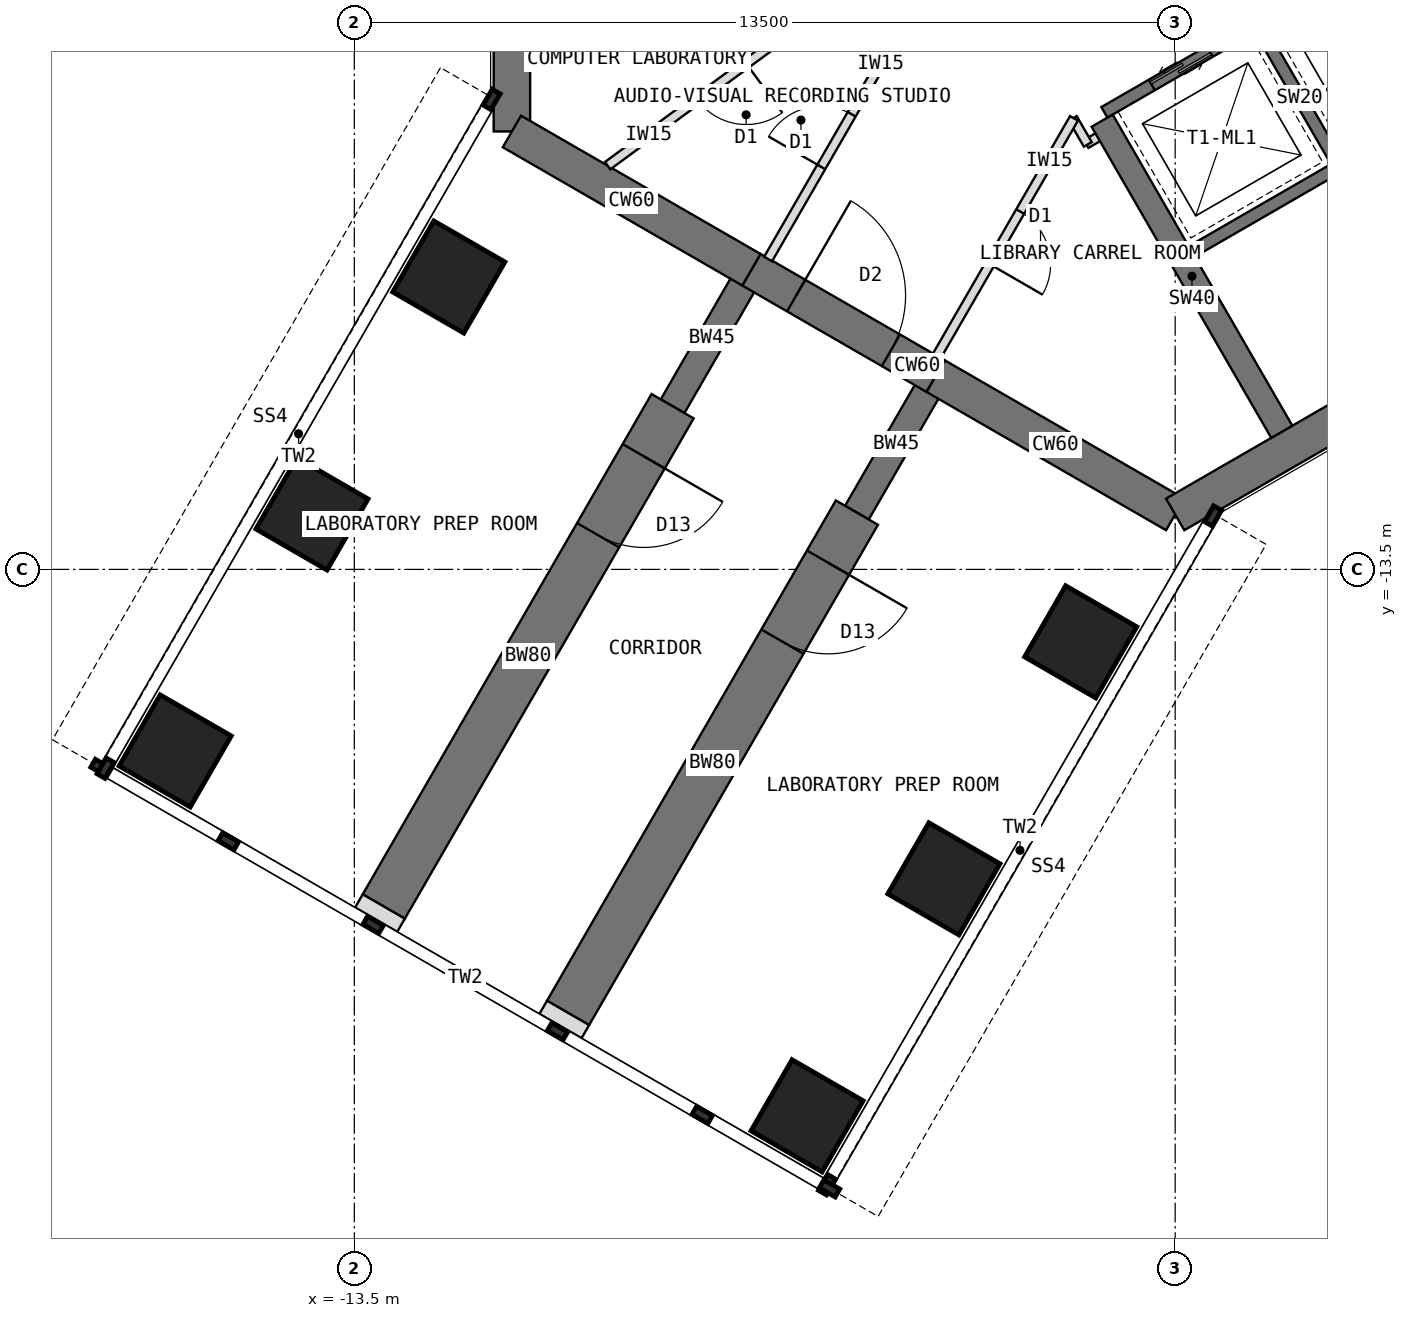
"""IFC4 building model, lengths in metres.
Left out: names, types, materials, properties, quantities, classifications, styles, units other than length and angle.
Written with IfcOpenShell. Run it as: python <this file> out.ifc"""

import sys

from ifc_helpers import new_model, si_unit, direction, frame, frame_2d, origin, origin_2d, place, context, subcontext, project, spatial, rectangle, extrude, element, fill, save


model = new_model("IFC4")
c1 = context("Model", 3, precision=1e-05, world=origin(), true_north=direction((0.0, 1.0)))
c2 = subcontext(c1, "Body", "Model", "MODEL_VIEW")
j1 = project(units=[si_unit("LENGTHUNIT", "METRE"), si_unit("PLANEANGLEUNIT", "RADIAN")], contexts=[c1])
p1 = place(None, origin())
s1 = spatial("IfcSite", under=j1, at=p1, CompositionType="ELEMENT")
p2 = place(p1, origin())
s2 = spatial("IfcBuilding", under=s1, at=p2, CompositionType="ELEMENT")
p3 = place(p2, frame((0.0, 0.0, 101.5)))
s3 = spatial("IfcBuildingStorey", under=s2, at=p3, CompositionType="ELEMENT", Elevation=101.5)
p4 = place(p3, frame((-10.908, 6.298, 0.0), z_axis=(0.0, 0.0, 1.0), x_axis=(0.0, -1.0, 0.0)))
e1 = element("IfcWall", 1, at=p4, inside=s3, PredefinedType="SHEAR", context=c2, shape_type="SweptSolid", body=[
    extrude(rectangle(XDim=12.596, YDim=0.6, at=frame_2d((6.298, 0.0))), origin(), (0.0, 0.0, 1.0), 4.0),
])
p5 = place(p3, frame((-10.908, -6.298, 0.0), z_axis=(0.0, 0.0, 1.0), x_axis=(0.866034513004, -0.499984222037, 0.0)))
e2 = element("IfcWall", 2, at=p5, inside=s3, PredefinedType="SHEAR", context=c2, shape_type="SweptSolid", body=[
    extrude(rectangle(XDim=4.548, YDim=0.6, at=frame_2d((2.274, 0.0))), origin(), (0.0, 0.0, 1.0), 4.0),
])
p6 = place(p3, frame((-6.97, -8.572, 0.0), z_axis=(0.0, 0.0, 1.0), x_axis=(0.866019471182, -0.500010275428, 0.0)))
e3 = element("IfcWall", 3, at=p6, inside=s3, PredefinedType="SHEAR", context=c2, shape_type="SweptSolid", body=[
    extrude(rectangle(XDim=3.5, YDim=0.6, at=frame_2d((1.75, 0.0))), origin(), (0.0, 0.0, 1.0), 4.0),
])
p7 = place(p6, frame((0.85, 0.0, 0.0)))
e4 = element("IfcOpeningElement", 4, at=p7, cuts=e3, PredefinedType="OPENING", context=c2, shape_type="SweptSolid", body=[
    extrude(rectangle(XDim=1.8, YDim=2.1, at=frame_2d((0.9, 1.05))), frame((0.0, 0.31, 0.0), z_axis=(0.0, -1.0, 0.0), x_axis=(1.0, 0.0, 0.0)), (0.0, 0.0, 1.0), 0.62),
])
p8 = place(p3, frame((-3.939, -10.322, 0.0), z_axis=(0.0, 0.0, 1.0), x_axis=(0.866011268655, -0.500024481964, 0.0)))
e5 = element("IfcWall", 5, at=p8, inside=s3, PredefinedType="SHEAR", context=c2, shape_type="SweptSolid", body=[
    extrude(rectangle(XDim=4.548, YDim=0.6, at=frame_2d((2.274, 0.0))), origin(), (0.0, 0.0, 1.0), 4.0),
])
p9 = place(p3, frame((0.0, -12.596, 0.0), z_axis=(0.0, 0.0, 1.0), x_axis=(0.866021940709, 0.500005998175, 0.0)))
e6 = element("IfcWall", 6, at=p9, inside=s3, PredefinedType="SHEAR", context=c2, shape_type="SweptSolid", body=[
    extrude(rectangle(XDim=12.596, YDim=0.6, at=frame_2d((6.298, 0.0))), origin(), (0.0, 0.0, 1.0), 4.0),
])
p10 = place(p3, frame((-3.939, -10.322, 0.0), z_axis=(0.0, 0.0, 1.0), x_axis=(-0.499918158782, -0.866072649678, 0.0)))
e7 = element("IfcWall", 7, at=p10, inside=s3, PredefinedType="SHEAR", context=c2, shape_type="SweptSolid", body=[
    extrude(rectangle(XDim=2.592, YDim=0.45, at=frame_2d((1.296, 0.0))), origin(), (0.0, 0.0, 1.0), 4.0),
])
p11 = place(p3, frame((-5.234, -12.566, 0.0), z_axis=(0.0, 0.0, 1.0), x_axis=(-0.499997557548, -0.86602681393, 0.0)))
e8 = element("IfcWall", 8, at=p11, inside=s3, PredefinedType="SHEAR", context=c2, shape_type="SweptSolid", body=[
    extrude(rectangle(XDim=9.5, YDim=0.8, at=frame_2d((4.75, 0.0))), origin(), (0.0, 0.0, 1.0), 4.0),
])
p12 = place(p11, frame((0.95, 0.0, 0.0)))
e9 = element("IfcOpeningElement", 9, at=p12, cuts=e8, PredefinedType="OPENING", context=c2, shape_type="SweptSolid", body=[
    extrude(rectangle(XDim=1.5, YDim=2.1, at=frame_2d((0.75, 1.05))), frame((0.0, 0.41, 0.0), z_axis=(0.0, -1.0, 0.0), x_axis=(1.0, 0.0, 0.0)), (0.0, 0.0, 1.0), 0.82),
])
p13 = place(p3, frame((-6.97, -8.572, 0.0), z_axis=(0.0, 0.0, 1.0), x_axis=(-0.499988811324, -0.866031863473, 0.0)))
e10 = element("IfcWall", 10, at=p13, inside=s3, PredefinedType="SHEAR", context=c2, shape_type="SweptSolid", body=[
    extrude(rectangle(XDim=2.592, YDim=0.45, at=frame_2d((1.296, 0.0))), origin(), (0.0, 0.0, 1.0), 4.0),
])
p14 = place(p3, frame((-8.266, -10.816, 0.0), z_axis=(0.0, 0.0, 1.0), x_axis=(-0.499997557548, -0.86602681393, 0.0)))
e11 = element("IfcWall", 11, at=p14, inside=s3, PredefinedType="SHEAR", context=c2, shape_type="SweptSolid", body=[
    extrude(rectangle(XDim=9.5, YDim=0.8, at=frame_2d((4.75, 0.0))), origin(), (0.0, 0.0, 1.0), 4.0),
])
p15 = place(p14, frame((0.95, 0.0, 0.0)))
e12 = element("IfcOpeningElement", 12, at=p15, cuts=e11, PredefinedType="OPENING", context=c2, shape_type="SweptSolid", body=[
    extrude(rectangle(XDim=1.5, YDim=2.1, at=frame_2d((0.75, 1.05))), frame((0.0, 0.41, 0.0), z_axis=(0.0, -1.0, 0.0), x_axis=(1.0, 0.0, 0.0)), (0.0, 0.0, 1.0), 0.82),
])
for number, where, z_axis, x_axis in (
    (13, (-1.554, -14.691, 0.0), (0.0, 0.0, 1.0), (0.5, 0.866, 0.0)),
    (14, (-11.946, -8.691, 0.0), (0.0, 0.0, 1.0), (0.5, 0.866, 0.0)),
    (15, (-3.804, -18.588, 0.0), (0.0, 0.0, 1.0), (0.5, 0.866, 0.0)),
    (16, (-14.196, -12.588, 0.0), (0.0, 0.0, 1.0), (0.5, 0.866, 0.0)),
    (17, (-6.054, -22.486, 0.0), (0.0, 0.0, 1.0), (0.5, 0.866, 0.0)),
    (18, (-16.446, -16.486, 0.0), (0.0, 0.0, 1.0), (0.5, 0.866, 0.0)),
):
    element("IfcColumn", number, at=place(p3, frame(where, z_axis=z_axis, x_axis=x_axis)), inside=s3, PredefinedType="COLUMN", context=c2, shape_type="SweptSolid", body=[
        extrude(rectangle(XDim=1.35, YDim=1.35, at=origin_2d()), origin(), (0.0, 0.0, 1.0), 4.0),
    ])
for number, where, z_axis, x_axis in (
    (19, (-9.984, -20.794, 0.0), (0.0, 0.0, 1.0), (-0.5, -0.866, 0.0)),
    (20, (-13.016, -19.044, 0.0), (0.0, 0.0, 1.0), (-0.5, -0.866, 0.0)),
):
    element("IfcWall", number, at=place(p3, frame(where, z_axis=z_axis, x_axis=x_axis)), inside=s3, PredefinedType="PARTITIONING", context=c2, shape_type="SweptSolid", body=[
        extrude(rectangle(XDim=0.25, YDim=0.8, at=frame_2d((0.125, 0.0))), origin(), (0.0, 0.0, 1.0), 3.8),
    ])
p16 = place(p3, frame((-1.164, -5.984, 0.0), z_axis=(0.0, 0.0, 1.0), x_axis=(0.866026010844, 0.49999894854, 0.0)))
e21 = element("IfcWall", 21, at=p16, inside=s3, PredefinedType="SHEAR", context=c2, shape_type="SweptSolid", body=[
    extrude(rectangle(XDim=8.0, YDim=0.2, at=frame_2d((4.0, 0.0))), origin(), (0.0, 0.0, 1.0), 4.0),
])
p17 = place(p16, frame((6.3, 0.0, 0.0)))
e22 = element("IfcOpeningElement", 22, at=p17, cuts=e21, PredefinedType="OPENING", context=c2, shape_type="SweptSolid", body=[
    extrude(rectangle(XDim=1.2, YDim=2.1, at=frame_2d((0.6, 1.05))), frame((0.0, 0.11, 0.0), z_axis=(0.0, -1.0, 0.0), x_axis=(1.0, 0.0, 0.0)), (0.0, 0.0, 1.0), 0.22),
])
p18 = place(p16, frame((0.9, 0.0, 0.0)))
e23 = element("IfcOpeningElement", 23, at=p18, cuts=e21, PredefinedType="OPENING", context=c2, shape_type="SweptSolid", body=[
    extrude(rectangle(XDim=1.1, YDim=2.2, at=frame_2d((0.55, 1.1))), frame((0.0, 0.11, 0.0), z_axis=(0.0, -1.0, 0.0), x_axis=(1.0, 0.0, 0.0)), (0.0, 0.0, 1.0), 0.22),
])
p19 = place(p16, frame((3.8, 0.0, 0.0)))
e24 = element("IfcOpeningElement", 24, at=p19, cuts=e21, PredefinedType="OPENING", context=c2, shape_type="SweptSolid", body=[
    extrude(rectangle(XDim=1.1, YDim=2.2, at=frame_2d((0.55, 1.1))), frame((0.0, 0.11, 0.0), z_axis=(0.0, -1.0, 0.0), x_axis=(1.0, 0.0, 0.0)), (0.0, 0.0, 1.0), 0.22),
])
p20 = place(p3, frame((1.397, -4.62, 0.0), z_axis=(0.0, 0.0, 1.0), x_axis=(0.499936506574, -0.866062058628, 0.0)))
e25 = element("IfcWall", 25, at=p20, inside=s3, PredefinedType="SHEAR", context=c2, shape_type="SweptSolid", body=[
    extrude(rectangle(XDim=2.6, YDim=0.2, at=frame_2d((1.3, 0.0))), origin(), (0.0, 0.0, 1.0), 4.0),
])
p21 = place(p3, frame((0.186, -8.322, 0.0), z_axis=(0.0, 0.0, 1.0), x_axis=(0.866026010844, 0.49999894854, 0.0)))
e26 = element("IfcWall", 26, at=p21, inside=s3, PredefinedType="SHEAR", context=c2, shape_type="SweptSolid", body=[
    extrude(rectangle(XDim=8.0, YDim=0.2, at=frame_2d((4.0, 0.0))), origin(), (0.0, 0.0, 1.0), 4.0),
])
p22 = place(p21, frame((6.7, 0.0, 0.0)))
e27 = element("IfcOpeningElement", 27, at=p22, cuts=e26, PredefinedType="OPENING", context=c2, shape_type="SweptSolid", body=[
    extrude(rectangle(XDim=1.1, YDim=2.1, at=frame_2d((0.55, 1.05))), frame((0.0, 0.11, 0.0), z_axis=(0.0, -1.0, 0.0), x_axis=(1.0, 0.0, 0.0)), (0.0, 0.0, 1.0), 0.22),
])
p23 = place(p3, frame((-1.201, -6.12, 0.0), z_axis=(0.0, 0.0, 1.0), x_axis=(0.49999668571, -0.866027317282, 0.0)))
e28 = element("IfcWall", 28, at=p23, inside=s3, PredefinedType="SHEAR", context=c2, shape_type="SweptSolid", body=[
    extrude(rectangle(XDim=5.908, YDim=0.4, at=frame_2d((2.954, 0.0))), origin(), (0.0, 0.0, 1.0), 4.0),
])
p24 = place(p3, frame((-1.092, -6.289, 0.0), z_axis=(0.0, 0.0, 1.0), x_axis=(-0.866138304741, -0.499804398801, 0.0)))
e29 = element("IfcWall", 29, at=p24, inside=s3, PredefinedType="PARTITIONING", context=c2, shape_type="SweptSolid", body=[
    extrude(rectangle(XDim=0.43, YDim=0.15, at=frame_2d((0.215, 0.0))), origin(), (0.0, 0.0, 1.0), 3.8),
])
p25 = place(p3, frame((-1.437, -6.511, 0.0), z_axis=(0.0, 0.0, 1.0), x_axis=(-0.50033519877, 0.865831790172, 0.0)))
e30 = element("IfcWall", 30, at=p25, inside=s3, PredefinedType="PARTITIONING", context=c2, shape_type="SweptSolid", body=[
    extrude(rectangle(XDim=0.494, YDim=0.15, at=frame_2d((0.247, 0.0))), origin(), (0.0, 0.0, 1.0), 3.8),
])
p26 = place(p3, frame((-1.664, -6.083, 0.0), z_axis=(0.0, 0.0, 1.0), x_axis=(-0.500032713409, -0.866006515865, 0.0)))
e31 = element("IfcWall", 31, at=p26, inside=s3, PredefinedType="PARTITIONING", context=c2, shape_type="SweptSolid", body=[
    extrude(rectangle(XDim=4.518, YDim=0.15, at=frame_2d((2.259, 0.0))), origin(), (0.0, 0.0, 1.0), 3.8),
])
p27 = place(p26, frame((1.769, 0.0, 0.0)))
e32 = element("IfcOpeningElement", 32, at=p27, cuts=e31, PredefinedType="OPENING", context=c2, shape_type="SweptSolid", body=[
    extrude(rectangle(XDim=1.0, YDim=2.1, at=frame_2d((0.5, 1.05))), frame((0.0, 0.085, 0.0), z_axis=(0.0, -1.0, 0.0), x_axis=(1.0, 0.0, 0.0)), (0.0, 0.0, 1.0), 0.17),
])
p28 = place(p3, frame((-6.695, -8.396, 0.0), z_axis=(0.0, 0.0, 1.0), x_axis=(0.500009315796, 0.86602002524, 0.0)))
e33 = element("IfcWall", 33, at=p28, inside=s3, PredefinedType="PARTITIONING", context=c2, shape_type="SweptSolid", body=[
    extrude(rectangle(XDim=4.519, YDim=0.15, at=frame_2d((2.259, 0.0))), origin(), (0.0, 0.0, 1.0), 3.8),
])
p29 = place(p28, frame((1.749, 0.0, 0.0)))
e34 = element("IfcOpeningElement", 34, at=p29, cuts=e33, PredefinedType="OPENING", context=c2, shape_type="SweptSolid", body=[
    extrude(rectangle(XDim=1.0, YDim=2.1, at=frame_2d((0.5, 1.05))), frame((0.0, 0.085, 0.0), z_axis=(0.0, -1.0, 0.0), x_axis=(1.0, 0.0, 0.0)), (0.0, 0.0, 1.0), 0.17),
])
p30 = place(p3, frame((-5.578, -4.1, 0.0), z_axis=(0.0, 0.0, 1.0), x_axis=(-0.805776726519, -0.592219441593, 0.0)))
e35 = element("IfcWall", 35, at=p30, inside=s3, PredefinedType="PARTITIONING", context=c2, shape_type="SweptSolid", body=[
    extrude(rectangle(XDim=4.661, YDim=0.15, at=frame_2d((2.331, 0.0))), origin(), (0.0, 0.0, 1.0), 3.8),
])
p31 = place(p30, frame((1.831, 0.0, 0.0)))
e36 = element("IfcOpeningElement", 36, at=p31, cuts=e35, PredefinedType="OPENING", context=c2, shape_type="SweptSolid", body=[
    extrude(rectangle(XDim=1.0, YDim=2.1, at=frame_2d((0.5, 1.05))), frame((0.0, 0.085, 0.0), z_axis=(0.0, -1.0, 0.0), x_axis=(1.0, 0.0, 0.0)), (0.0, 0.0, 1.0), 0.17),
])
p32 = place(p18, origin())
e37 = element("IfcDoor", 37, at=p32, inside=s3, OperationType="DOUBLE_DOOR_SLIDING", PredefinedType="DOOR", context=c2, shape_type="SweptSolid", body=[
    extrude(rectangle(XDim=1.1, YDim=2.2, at=frame_2d((0.55, 1.1))), frame((0.0, 0.025, 0.0), z_axis=(0.0, -1.0, 0.0), x_axis=(1.0, 0.0, 0.0)), (0.0, 0.0, 1.0), 0.05),
])
fill(e23, e37)
p33 = place(p7, origin())
e38 = element("IfcDoor", 38, at=p33, inside=s3, OperationType="DOUBLE_DOOR_DOUBLE_SWING", PredefinedType="DOOR", context=c2, shape_type="SweptSolid", body=[
    extrude(rectangle(XDim=1.72, YDim=2.06, at=frame_2d((0.9, 1.03))), frame((0.0, 0.025, 0.0), z_axis=(0.0, -1.0, 0.0), x_axis=(1.0, 0.0, 0.0)), (0.0, 0.0, 1.0), 0.05),
    extrude(rectangle(XDim=0.04, YDim=2.1, at=frame_2d((0.02, 1.05))), frame((0.0, 0.3, 0.0), z_axis=(0.0, -1.0, 0.0), x_axis=(1.0, 0.0, 0.0)), (0.0, 0.0, 1.0), 0.6),
    extrude(rectangle(XDim=0.04, YDim=2.1, at=frame_2d((1.78, 1.05))), frame((0.0, 0.3, 0.0), z_axis=(0.0, -1.0, 0.0), x_axis=(1.0, 0.0, 0.0)), (0.0, 0.0, 1.0), 0.6),
    extrude(rectangle(XDim=1.72, YDim=0.04, at=frame_2d((0.9, 2.08))), frame((0.0, 0.3, 0.0), z_axis=(0.0, -1.0, 0.0), x_axis=(1.0, 0.0, 0.0)), (0.0, 0.0, 1.0), 0.6),
])
fill(e4, e38)
p34 = place(p31, origin())
e39 = element("IfcDoor", 39, at=p34, inside=s3, OperationType="SINGLE_SWING_LEFT", PredefinedType="DOOR", context=c2, shape_type="SweptSolid", body=[
    extrude(rectangle(XDim=1.0, YDim=2.1, at=frame_2d((0.5, 1.05))), frame((0.0, 0.025, 0.0), z_axis=(0.0, -1.0, 0.0), x_axis=(1.0, 0.0, 0.0)), (0.0, 0.0, 1.0), 0.05),
])
fill(e36, e39)
p35 = place(p29, origin())
e40 = element("IfcDoor", 40, at=p35, inside=s3, OperationType="SINGLE_SWING_LEFT", PredefinedType="DOOR", context=c2, shape_type="SweptSolid", body=[
    extrude(rectangle(XDim=1.0, YDim=2.1, at=frame_2d((0.5, 1.05))), frame((0.0, 0.025, 0.0), z_axis=(0.0, -1.0, 0.0), x_axis=(1.0, 0.0, 0.0)), (0.0, 0.0, 1.0), 0.05),
])
fill(e34, e40)
p36 = place(p27, origin())
e41 = element("IfcDoor", 41, at=p36, inside=s3, OperationType="SINGLE_SWING_RIGHT", PredefinedType="DOOR", context=c2, shape_type="SweptSolid", body=[
    extrude(rectangle(XDim=1.0, YDim=2.1, at=frame_2d((0.5, 1.05))), frame((0.0, 0.025, 0.0), z_axis=(0.0, -1.0, 0.0), x_axis=(1.0, 0.0, 0.0)), (0.0, 0.0, 1.0), 0.05),
])
fill(e32, e41)
p37 = place(p12, origin())
e42 = element("IfcDoor", 42, at=p37, inside=s3, OperationType="DOUBLE_DOOR_SINGLE_SWING", PredefinedType="DOOR", context=c2, shape_type="SweptSolid", body=[
    extrude(rectangle(XDim=1.42, YDim=2.06, at=frame_2d((0.75, 1.03))), frame((0.0, 0.025, 0.0), z_axis=(0.0, -1.0, 0.0), x_axis=(1.0, 0.0, 0.0)), (0.0, 0.0, 1.0), 0.05),
    extrude(rectangle(XDim=0.04, YDim=2.1, at=frame_2d((0.02, 1.05))), frame((0.0, 0.4, 0.0), z_axis=(0.0, -1.0, 0.0), x_axis=(1.0, 0.0, 0.0)), (0.0, 0.0, 1.0), 0.8),
    extrude(rectangle(XDim=0.04, YDim=2.1, at=frame_2d((1.48, 1.05))), frame((0.0, 0.4, 0.0), z_axis=(0.0, -1.0, 0.0), x_axis=(1.0, 0.0, 0.0)), (0.0, 0.0, 1.0), 0.8),
    extrude(rectangle(XDim=1.42, YDim=0.04, at=frame_2d((0.75, 2.08))), frame((0.0, 0.4, 0.0), z_axis=(0.0, -1.0, 0.0), x_axis=(1.0, 0.0, 0.0)), (0.0, 0.0, 1.0), 0.8),
])
fill(e9, e42)
p38 = place(p15, origin())
e43 = element("IfcDoor", 43, at=p38, inside=s3, OperationType="DOUBLE_DOOR_SINGLE_SWING", PredefinedType="DOOR", context=c2, shape_type="SweptSolid", body=[
    extrude(rectangle(XDim=1.42, YDim=2.06, at=frame_2d((0.75, 1.03))), frame((0.0, 0.025, 0.0), z_axis=(0.0, -1.0, 0.0), x_axis=(1.0, 0.0, 0.0)), (0.0, 0.0, 1.0), 0.05),
    extrude(rectangle(XDim=0.04, YDim=2.1, at=frame_2d((0.02, 1.05))), frame((0.0, 0.4, 0.0), z_axis=(0.0, -1.0, 0.0), x_axis=(1.0, 0.0, 0.0)), (0.0, 0.0, 1.0), 0.8),
    extrude(rectangle(XDim=0.04, YDim=2.1, at=frame_2d((1.48, 1.05))), frame((0.0, 0.4, 0.0), z_axis=(0.0, -1.0, 0.0), x_axis=(1.0, 0.0, 0.0)), (0.0, 0.0, 1.0), 0.8),
    extrude(rectangle(XDim=1.42, YDim=0.04, at=frame_2d((0.75, 2.08))), frame((0.0, 0.4, 0.0), z_axis=(0.0, -1.0, 0.0), x_axis=(1.0, 0.0, 0.0)), (0.0, 0.0, 1.0), 0.8),
])
fill(e12, e43)
save(model, sys.argv[1])
